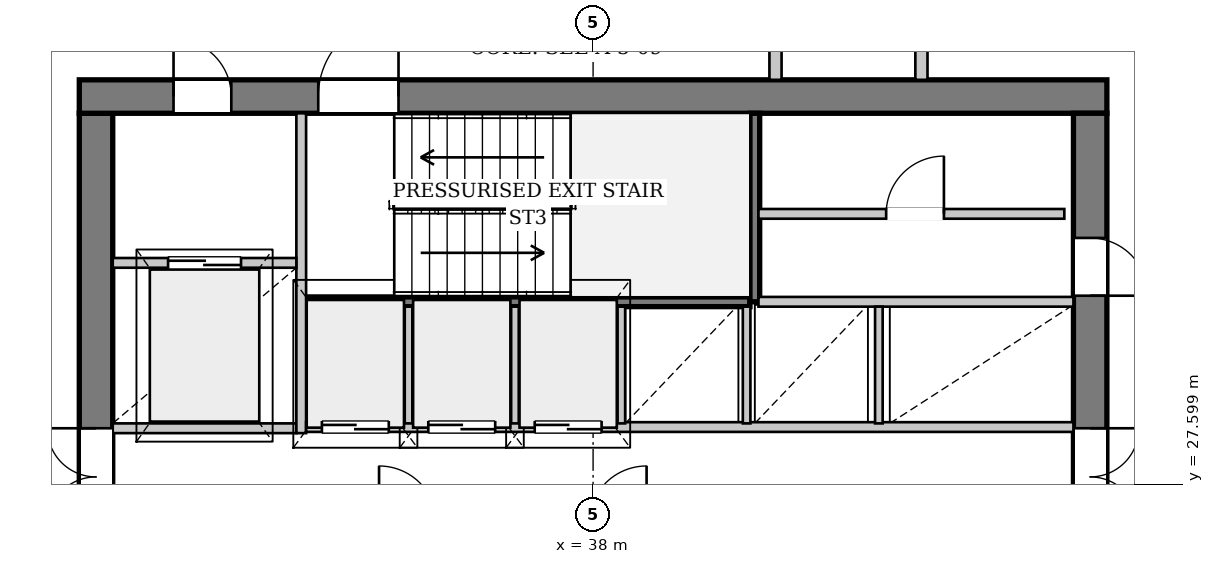
"""IFC4 building model, lengths in metres.
Left out: names, types, materials, properties, quantities, classifications, styles, units other than length and angle.
Written with IfcOpenShell. Run it as: python <this file> out.ifc"""

import sys

from ifc_helpers import new_model, si_unit, direction, frame, frame_2d, origin, place, context, subcontext, project, spatial, rectangle, extrude, source, transform, mapped, element, fill, save


model = new_model("IFC4")
c1 = context("Model", 3, precision=1e-05, world=origin(), true_north=direction((0.0, 1.0)))
c2 = subcontext(c1, "Body", "Model", "MODEL_VIEW")
j1 = project(units=[si_unit("LENGTHUNIT", "METRE"), si_unit("PLANEANGLEUNIT", "RADIAN")], contexts=[c1])
p1 = place(None, origin())
s1 = spatial("IfcSite", under=j1, at=p1, CompositionType="ELEMENT")
p2 = place(p1, origin())
s2 = spatial("IfcBuilding", under=s1, at=p2, CompositionType="ELEMENT")
p3 = place(p2, frame((0.0, 0.0, 189.2)))
s3 = spatial("IfcBuildingStorey", under=s2, at=p3, CompositionType="ELEMENT", Elevation=189.2)
p4 = place(p3, frame((16.245, 34.55, 0.0), z_axis=(0.0, 0.0, 1.0), x_axis=(0.933308155782, 0.359076435249, 0.0)))
e1 = element("IfcWall", 1, at=p4, inside=s3, PredefinedType="SOLIDWALL", context=c2, shape_type="SweptSolid", body=[
    extrude(rectangle(XDim=22.685, YDim=0.38, at=frame_2d((11.343, 0.0))), origin(), (0.0, 0.0, 1.0), 2.722),
])
p5 = place(p4, frame((5.752, 0.0, 0.65)))
e2 = element("IfcOpeningElement", 2, at=p5, cuts=e1, PredefinedType="OPENING", context=c2, shape_type="SweptSolid", body=[
    extrude(rectangle(XDim=1.2, YDim=1.5, at=frame_2d((0.6, 0.75))), frame((0.0, 0.2, 0.0), z_axis=(0.0, -1.0, 0.0), x_axis=(1.0, 0.0, 0.0)), (0.0, 0.0, 1.0), 0.4),
])
p6 = place(p4, frame((15.733, 0.0, 0.65)))
e3 = element("IfcOpeningElement", 3, at=p6, cuts=e1, PredefinedType="OPENING", context=c2, shape_type="SweptSolid", body=[
    extrude(rectangle(XDim=1.2, YDim=1.5, at=frame_2d((0.6, 0.75))), frame((0.0, 0.2, 0.0), z_axis=(0.0, -1.0, 0.0), x_axis=(1.0, 0.0, 0.0)), (0.0, 0.0, 1.0), 0.4),
])
p7 = place(p3, frame((29.825, 19.5, 0.0), z_axis=(0.0, 0.0, 1.0), x_axis=(0.0, 1.0, 0.0)))
e4 = element("IfcWall", 4, at=p7, inside=s3, PredefinedType="SHEAR", context=c2, shape_type="SweptSolid", body=[
    extrude(rectangle(XDim=14.2, YDim=0.55, at=frame_2d((7.1, 0.0))), origin(), (0.0, 0.0, 1.0), 3.33),
])
p8 = place(p7, frame((7.42, 0.0, 0.0)))
e5 = element("IfcOpeningElement", 5, at=p8, cuts=e4, PredefinedType="OPENING", context=c2, shape_type="SweptSolid", body=[
    extrude(rectangle(XDim=1.6, YDim=2.2, at=frame_2d((0.8, 1.1))), frame((0.0, 0.285, 0.0), z_axis=(0.0, -1.0, 0.0), x_axis=(1.0, 0.0, 0.0)), (0.0, 0.0, 1.0), 0.57),
])
p9 = place(p3, frame((29.55, 33.975, 0.0), z_axis=(0.0, 0.0, 1.0), x_axis=(1.0, 0.0, 0.0)))
e6 = element("IfcWall", 6, at=p9, inside=s3, PredefinedType="SHEAR", context=c2, shape_type="SweptSolid", body=[
    extrude(rectangle(XDim=16.9, YDim=0.55, at=frame_2d((8.45, 0.0))), origin(), (0.0, 0.0, 1.0), 3.33),
])
p10 = place(p9, frame((1.55, 0.0, 0.0)))
e7 = element("IfcOpeningElement", 7, at=p10, cuts=e6, PredefinedType="OPENING", context=c2, shape_type="SweptSolid", body=[
    extrude(rectangle(XDim=0.95, YDim=2.1, at=frame_2d((0.475, 1.05))), frame((0.0, 0.285, 0.0), z_axis=(0.0, -1.0, 0.0), x_axis=(1.0, 0.0, 0.0)), (0.0, 0.0, 1.0), 0.57),
])
p11 = place(p9, frame((3.93, 0.0, 0.0)))
e8 = element("IfcOpeningElement", 8, at=p11, cuts=e6, PredefinedType="OPENING", context=c2, shape_type="SweptSolid", body=[
    extrude(rectangle(XDim=1.32, YDim=2.2, at=frame_2d((0.66, 1.1))), frame((0.0, 0.285, 0.0), z_axis=(0.0, -1.0, 0.0), x_axis=(1.0, 0.0, 0.0)), (0.0, 0.0, 1.0), 0.57),
])
p12 = place(p3, frame((46.175, 33.7, 0.0), z_axis=(0.0, 0.0, 1.0), x_axis=(0.0, -1.0, 0.0)))
e9 = element("IfcWall", 9, at=p12, inside=s3, PredefinedType="SHEAR", context=c2, shape_type="SweptSolid", body=[
    extrude(rectangle(XDim=14.2, YDim=0.55, at=frame_2d((7.1, 0.0))), origin(), (0.0, 0.0, 1.0), 3.33),
])
p13 = place(p12, frame((5.18, 0.0, 0.0)))
e10 = element("IfcOpeningElement", 10, at=p13, cuts=e9, PredefinedType="OPENING", context=c2, shape_type="SweptSolid", body=[
    extrude(rectangle(XDim=1.6, YDim=2.2, at=frame_2d((0.8, 1.1))), frame((0.0, 0.285, 0.0), z_axis=(0.0, -1.0, 0.0), x_axis=(1.0, 0.0, 0.0)), (0.0, 0.0, 1.0), 0.57),
])
p14 = place(p12, frame((2.05, 0.0, 0.0)))
e11 = element("IfcOpeningElement", 11, at=p14, cuts=e9, PredefinedType="OPENING", context=c2, shape_type="SweptSolid", body=[
    extrude(rectangle(XDim=0.95, YDim=2.1, at=frame_2d((0.475, 1.05))), frame((0.0, 0.285, 0.0), z_axis=(0.0, -1.0, 0.0), x_axis=(1.0, 0.0, 0.0)), (0.0, 0.0, 1.0), 0.57),
])
p15 = place(p3, frame((33.28, 30.6, 0.0), z_axis=(0.0, 0.0, 1.0), x_axis=(1.0, 0.0, 0.0)))
e12 = element("IfcWall", 12, at=p15, inside=s3, PredefinedType="PARTITIONING", context=c2, shape_type="SweptSolid", body=[
    extrude(rectangle(XDim=7.3, YDim=0.16, at=frame_2d((3.65, 0.0))), origin(), (0.0, 0.0, 1.0), 3.33),
])
p16 = place(p3, frame((40.66, 30.6, 0.0), z_axis=(0.0, 0.0, 1.0), x_axis=(0.0, 1.0, 0.0)))
e13 = element("IfcWall", 13, at=p16, inside=s3, PredefinedType="PARTITIONING", context=c2, shape_type="SweptSolid", body=[
    extrude(rectangle(XDim=3.1, YDim=0.16, at=frame_2d((1.55, 0.0))), origin(), (0.0, 0.0, 1.0), 3.33),
])
p17 = place(p3, frame((30.1, 28.52, 0.0), z_axis=(0.0, 0.0, 1.0), x_axis=(1.0, 0.0, 0.0)))
e14 = element("IfcWall", 14, at=p17, inside=s3, PredefinedType="PARTITIONING", context=c2, shape_type="SweptSolid", body=[
    extrude(rectangle(XDim=3.02, YDim=0.16, at=frame_2d((1.51, 0.0))), origin(), (0.0, 0.0, 1.0), 3.33),
])
p18 = place(p3, frame((33.2, 28.44, 0.0), z_axis=(0.0, 0.0, 1.0), x_axis=(0.0, 1.0, 0.0)))
e15 = element("IfcWall", 15, at=p18, inside=s3, PredefinedType="PARTITIONING", context=c2, shape_type="SweptSolid", body=[
    extrude(rectangle(XDim=5.26, YDim=0.16, at=frame_2d((2.63, 0.0))), origin(), (0.0, 0.0, 1.0), 3.33),
])
p19 = place(p3, frame((30.1, 31.24, 0.0), z_axis=(0.0, 0.0, 1.0), x_axis=(1.0, 0.0, 0.0)))
e16 = element("IfcWall", 16, at=p19, inside=s3, PredefinedType="PARTITIONING", context=c2, shape_type="SweptSolid", body=[
    extrude(rectangle(XDim=3.02, YDim=0.16, at=frame_2d((1.51, 0.0))), origin(), (0.0, 0.0, 1.0), 3.33),
])
p20 = place(p19, frame((0.91, 0.0, 0.0)))
e17 = element("IfcOpeningElement", 17, at=p20, cuts=e16, PredefinedType="OPENING", context=c2, shape_type="SweptSolid", body=[
    extrude(rectangle(XDim=1.2, YDim=2.2, at=frame_2d((0.6, 1.1))), frame((0.0, 0.09, 0.0), z_axis=(0.0, -1.0, 0.0), x_axis=(1.0, 0.0, 0.0)), (0.0, 0.0, 1.0), 0.18),
])
p21 = place(p3, frame((33.28, 28.54, 0.0), z_axis=(0.0, 0.0, 1.0), x_axis=(1.0, 0.0, 0.0)))
e18 = element("IfcWall", 18, at=p21, inside=s3, PredefinedType="PARTITIONING", context=c2, shape_type="SweptSolid", body=[
    extrude(rectangle(XDim=12.62, YDim=0.16, at=frame_2d((6.31, 0.0))), origin(), (0.0, 0.0, 1.0), 3.33),
])
p22 = place(p21, frame((0.26, 0.0, 0.0)))
e19 = element("IfcOpeningElement", 19, at=p22, cuts=e18, PredefinedType="OPENING", context=c2, shape_type="SweptSolid", body=[
    extrude(rectangle(XDim=1.1, YDim=2.2, at=frame_2d((0.55, 1.1))), frame((0.0, 0.09, 0.0), z_axis=(0.0, -1.0, 0.0), x_axis=(1.0, 0.0, 0.0)), (0.0, 0.0, 1.0), 0.18),
])
p23 = place(p21, frame((2.01, 0.0, 0.0)))
e20 = element("IfcOpeningElement", 20, at=p23, cuts=e18, PredefinedType="OPENING", context=c2, shape_type="SweptSolid", body=[
    extrude(rectangle(XDim=1.1, YDim=2.2, at=frame_2d((0.55, 1.1))), frame((0.0, 0.09, 0.0), z_axis=(0.0, -1.0, 0.0), x_axis=(1.0, 0.0, 0.0)), (0.0, 0.0, 1.0), 0.18),
])
p24 = place(p21, frame((3.76, 0.0, 0.0)))
e21 = element("IfcOpeningElement", 21, at=p24, cuts=e18, PredefinedType="OPENING", context=c2, shape_type="SweptSolid", body=[
    extrude(rectangle(XDim=1.1, YDim=2.2, at=frame_2d((0.55, 1.1))), frame((0.0, 0.09, 0.0), z_axis=(0.0, -1.0, 0.0), x_axis=(1.0, 0.0, 0.0)), (0.0, 0.0, 1.0), 0.18),
])
p25 = place(p3, frame((40.72, 30.6, 0.0), z_axis=(0.0, 0.0, 1.0), x_axis=(1.0, 0.0, 0.0)))
e22 = element("IfcWall", 22, at=p25, inside=s3, PredefinedType="PARTITIONING", context=c2, shape_type="SweptSolid", body=[
    extrude(rectangle(XDim=5.18, YDim=0.16, at=frame_2d((2.59, 0.0))), origin(), (0.0, 0.0, 1.0), 3.33),
])
for number, where, z_axis, x_axis in (
    (23, (34.965, 28.6, 0.0), (0.0, 0.0, 1.0), (0.0, 1.0, 0.0)),
    (24, (36.715, 28.6, 0.0), (0.0, 0.0, 1.0), (0.0, 1.0, 0.0)),
    (25, (38.465, 28.6, 0.0), (0.0, 0.0, 1.0), (0.0, 1.0, 0.0)),
    (26, (40.525, 28.6, 0.0), (0.0, 0.0, 1.0), (0.0, 1.0, 0.0)),
    (27, (42.7, 28.6, 0.0), (0.0, 0.0, 1.0), (0.0, 1.0, 0.0)),
):
    element("IfcWall", number, at=place(p3, frame(where, z_axis=z_axis, x_axis=x_axis)), inside=s3, PredefinedType="PARTITIONING", context=c2, shape_type="SweptSolid", body=[
        extrude(rectangle(XDim=1.92, YDim=0.125, at=frame_2d((0.96, 0.0))), origin(), (0.0, 0.0, 1.0), 3.33),
    ])
p26 = place(p3, frame((40.72, 32.046, 0.0), z_axis=(0.0, 0.0, 1.0), x_axis=(1.0, 0.0, 0.0)))
e28 = element("IfcWall", 28, at=p26, inside=s3, PredefinedType="PARTITIONING", context=c2, shape_type="SweptSolid", body=[
    extrude(rectangle(XDim=5.03, YDim=0.16, at=frame_2d((2.515, 0.0))), origin(), (0.0, 0.0, 1.0), 3.33),
])
p27 = place(p26, frame((2.1, 0.0, 0.0)))
e29 = element("IfcOpeningElement", 29, at=p27, cuts=e28, PredefinedType="OPENING", context=c2, shape_type="SweptSolid", body=[
    extrude(rectangle(XDim=0.95, YDim=2.1, at=frame_2d((0.475, 1.05))), frame((0.0, 0.09, 0.0), z_axis=(0.0, -1.0, 0.0), x_axis=(1.0, 0.0, 0.0)), (0.0, 0.0, 1.0), 0.18),
])
for number, where, z_axis, x_axis in (
    (30, (41.0, 34.25, 0.0), (0.0, 0.0, 1.0), (0.0, 1.0, 0.0)),
    (31, (43.4, 34.25, 0.0), (0.0, 0.0, 1.0), (0.0, 1.0, 0.0)),
):
    element("IfcWall", number, at=place(p3, frame(where, z_axis=z_axis, x_axis=x_axis)), inside=s3, PredefinedType="PARTITIONING", context=c2, shape_type="SweptSolid", body=[
        extrude(rectangle(XDim=1.95, YDim=0.2, at=frame_2d((0.975, 0.0))), origin(), (0.0, 0.0, 1.0), 3.33),
    ])
m1 = source(origin(), c2, "Body", "SweptSolid", [
    extrude(rectangle(XDim=1.6, YDim=2.2, at=frame_2d((0.8, 1.1))), frame((0.0, 0.025, 0.0), z_axis=(0.0, -1.0, 0.0), x_axis=(1.0, 0.0, 0.0)), (0.0, 0.0, 1.0), 0.05),
])
p28 = place(p8, origin())
e32 = element("IfcDoor", 32, at=p28, inside=s3, OperationType="DOUBLE_DOOR_SINGLE_SWING", PredefinedType="DOOR", context=c2, shape_type="MappedRepresentation", body=[
    mapped(m1, transform((0.0, 0.0, 0.0), x_axis=(1.0, 0.0, 0.0), y_axis=(0.0, 1.0, 0.0), z_axis=(0.0, 0.0, 1.0), scale=1.0)),
])
fill(e5, e32)
m2 = source(origin(), c2, "Body", "SweptSolid", [
    extrude(rectangle(XDim=0.95, YDim=2.1, at=frame_2d((0.475, 1.05))), frame((0.0, 0.025, 0.0), z_axis=(0.0, -1.0, 0.0), x_axis=(1.0, 0.0, 0.0)), (0.0, 0.0, 1.0), 0.05),
])
p29 = place(p10, origin())
e33 = element("IfcDoor", 33, at=p29, inside=s3, OperationType="SINGLE_SWING_LEFT", PredefinedType="DOOR", context=c2, shape_type="MappedRepresentation", body=[
    mapped(m2, transform((0.0, 0.0, 0.0), x_axis=(1.0, 0.0, 0.0), y_axis=(0.0, 1.0, 0.0), z_axis=(0.0, 0.0, 1.0), scale=1.0)),
])
fill(e7, e33)
m3 = source(origin(), c2, "Body", "SweptSolid", [
    extrude(rectangle(XDim=1.32, YDim=2.2, at=frame_2d((0.66, 1.1))), frame((0.0, 0.025, 0.0), z_axis=(0.0, -1.0, 0.0), x_axis=(1.0, 0.0, 0.0)), (0.0, 0.0, 1.0), 0.05),
])
p30 = place(p11, origin())
e34 = element("IfcDoor", 34, at=p30, inside=s3, OperationType="SINGLE_SWING_RIGHT", PredefinedType="DOOR", context=c2, shape_type="MappedRepresentation", body=[
    mapped(m3, transform((0.0, 0.0, 0.0), x_axis=(1.0, 0.0, 0.0), y_axis=(0.0, 1.0, 0.0), z_axis=(0.0, 0.0, 1.0), scale=1.0)),
])
fill(e8, e34)
p31 = place(p13, origin())
e35 = element("IfcDoor", 35, at=p31, inside=s3, OperationType="DOUBLE_DOOR_SINGLE_SWING", PredefinedType="DOOR", context=c2, shape_type="MappedRepresentation", body=[
    mapped(m1, transform((0.0, 0.0, 0.0), x_axis=(1.0, 0.0, 0.0), y_axis=(0.0, 1.0, 0.0), z_axis=(0.0, 0.0, 1.0), scale=1.0)),
])
fill(e10, e35)
m4 = source(origin(), c2, "Body", "SweptSolid", [
    extrude(rectangle(XDim=1.2, YDim=2.2, at=frame_2d((0.6, 1.1))), frame((0.0, 0.025, 0.0), z_axis=(0.0, -1.0, 0.0), x_axis=(1.0, 0.0, 0.0)), (0.0, 0.0, 1.0), 0.05),
])
p32 = place(p20, origin())
e36 = element("IfcDoor", 36, at=p32, inside=s3, OperationType="DOUBLE_DOOR_SLIDING", PredefinedType="DOOR", context=c2, shape_type="MappedRepresentation", body=[
    mapped(m4, transform((0.0, 0.0, 0.0), x_axis=(1.0, 0.0, 0.0), y_axis=(0.0, 1.0, 0.0), z_axis=(0.0, 0.0, 1.0), scale=1.0)),
])
fill(e17, e36)
m5 = source(origin(), c2, "Body", "SweptSolid", [
    extrude(rectangle(XDim=1.1, YDim=2.2, at=frame_2d((0.55, 1.1))), frame((0.0, 0.025, 0.0), z_axis=(0.0, -1.0, 0.0), x_axis=(1.0, 0.0, 0.0)), (0.0, 0.0, 1.0), 0.05),
])
p33 = place(p22, origin())
e37 = element("IfcDoor", 37, at=p33, inside=s3, OperationType="DOUBLE_DOOR_SLIDING", PredefinedType="DOOR", context=c2, shape_type="MappedRepresentation", body=[
    mapped(m5, transform((0.0, 0.0, 0.0), x_axis=(1.0, 0.0, 0.0), y_axis=(0.0, 1.0, 0.0), z_axis=(0.0, 0.0, 1.0), scale=1.0)),
])
fill(e19, e37)
p34 = place(p23, origin())
e38 = element("IfcDoor", 38, at=p34, inside=s3, OperationType="DOUBLE_DOOR_SLIDING", PredefinedType="DOOR", context=c2, shape_type="MappedRepresentation", body=[
    mapped(m5, transform((0.0, 0.0, 0.0), x_axis=(1.0, 0.0, 0.0), y_axis=(0.0, 1.0, 0.0), z_axis=(0.0, 0.0, 1.0), scale=1.0)),
])
fill(e20, e38)
p35 = place(p24, origin())
e39 = element("IfcDoor", 39, at=p35, inside=s3, OperationType="DOUBLE_DOOR_SLIDING", PredefinedType="DOOR", context=c2, shape_type="MappedRepresentation", body=[
    mapped(m5, transform((0.0, 0.0, 0.0), x_axis=(1.0, 0.0, 0.0), y_axis=(0.0, 1.0, 0.0), z_axis=(0.0, 0.0, 1.0), scale=1.0)),
])
fill(e21, e39)
p36 = place(p27, origin())
e40 = element("IfcDoor", 40, at=p36, inside=s3, OperationType="SINGLE_SWING_RIGHT", PredefinedType="DOOR", context=c2, shape_type="MappedRepresentation", body=[
    mapped(m2, transform((0.0, 0.0, 0.0), x_axis=(1.0, 0.0, 0.0), y_axis=(0.0, 1.0, 0.0), z_axis=(0.0, 0.0, 1.0), scale=1.0)),
])
fill(e29, e40)
p37 = place(p14, origin())
e41 = element("IfcDoor", 41, at=p37, inside=s3, OperationType="SINGLE_SWING_RIGHT", PredefinedType="DOOR", context=c2, shape_type="MappedRepresentation", body=[
    mapped(m2, transform((0.0, 0.0, 0.0), x_axis=(1.0, 0.0, 0.0), y_axis=(0.0, 1.0, 0.0), z_axis=(0.0, 0.0, 1.0), scale=1.0)),
])
fill(e11, e41)
save(model, sys.argv[1])
